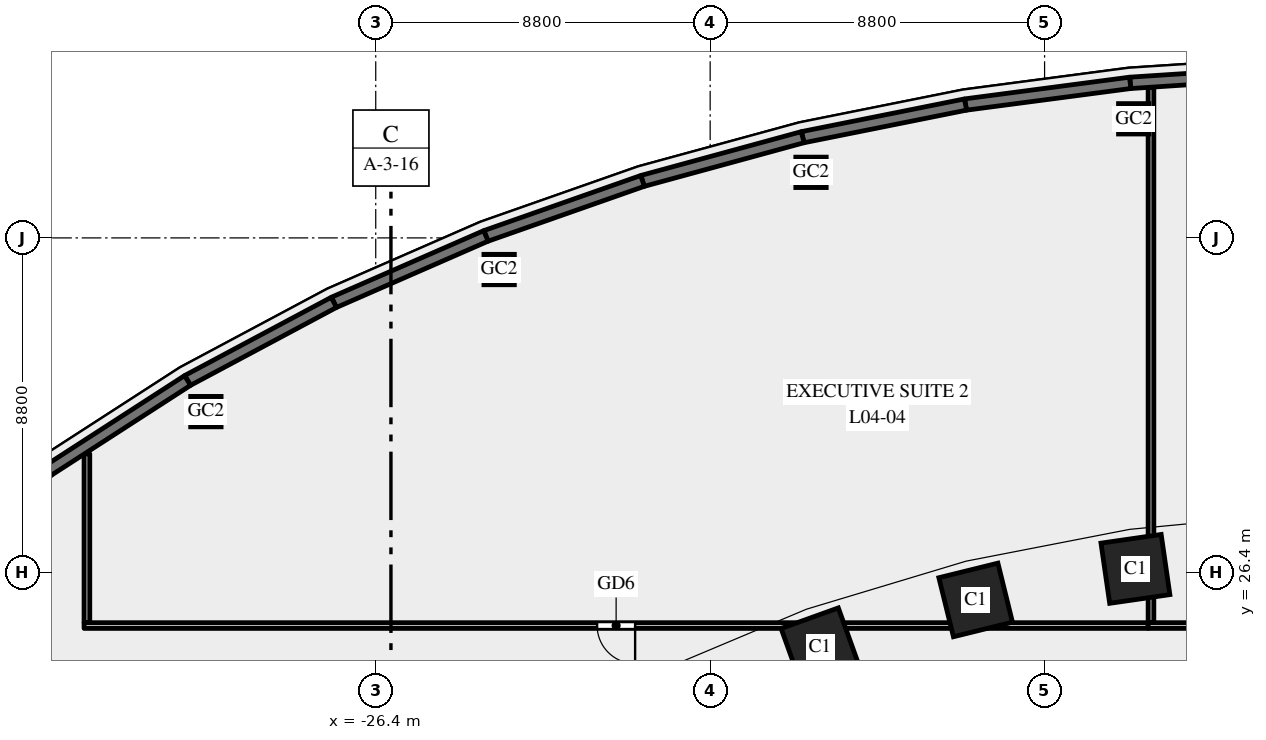
"""IFC4 building model, lengths in metres.
Left out: names, types, materials, properties, quantities, classifications, styles, units other than length and angle.
Written with IfcOpenShell. Run it as: python <this file> out.ifc"""

import sys

from ifc_helpers import new_model, si_unit, direction, frame, frame_2d, origin, origin_2d, place, context, subcontext, project, spatial, rectangle, hollow_rectangle, extrude, element, fill, save


model = new_model("IFC4")
c1 = context("Model", 3, precision=1e-05, world=origin(), true_north=direction((0.0, 1.0)))
c2 = subcontext(c1, "Body", "Model", "MODEL_VIEW")
j1 = project(units=[si_unit("LENGTHUNIT", "METRE"), si_unit("PLANEANGLEUNIT", "RADIAN")], contexts=[c1])
p1 = place(None, origin())
s1 = spatial("IfcSite", under=j1, at=p1, CompositionType="ELEMENT")
p2 = place(p1, origin())
s2 = spatial("IfcBuilding", under=s1, at=p2, CompositionType="ELEMENT")
p3 = place(p2, frame((0.0, 0.0, 25.0)))
s3 = spatial("IfcBuildingStorey", under=s2, at=p3, CompositionType="ELEMENT", Elevation=25.0)
for number, where, z_axis, x_axis in (
    (1, (-6.409, 26.491, 0.0), (0.0, 0.0, 1.0), (-0.99, -0.143, 0.0)),
    (2, (-10.613, 25.674, 0.0), (0.0, 0.0, 1.0), (-0.971, -0.24, 0.0)),
    (3, (-14.709, 24.441, 0.0), (0.0, 0.0, 1.0), (-0.941, -0.338, 0.0)),
):
    element("IfcColumn", number, at=place(p3, frame(where, z_axis=z_axis, x_axis=x_axis)), inside=s3, PredefinedType="COLUMN", context=c2, shape_type="SweptSolid", body=[
        extrude(rectangle(XDim=1.6, YDim=1.6, at=origin_2d()), origin(), (0.0, 0.0, 1.0), 5.5),
    ])
for number, where, z_axis, x_axis in (
    (4, (-6.454, 38.333, 0.0), (0.0, 0.0, 1.0), (1.0, 0.0, 0.0)),
    (5, (-14.946, 36.925, 0.0), (0.0, 0.0, 1.0), (1.0, 0.0, 0.0)),
    (6, (-23.153, 34.368, 0.0), (0.0, 0.0, 1.0), (1.0, 0.0, 0.0)),
    (7, (-30.869, 30.629, 0.0), (0.0, 0.0, 1.0), (1.0, 0.0, 0.0)),
):
    element("IfcColumn", number, at=place(p3, frame(where, z_axis=z_axis, x_axis=x_axis)), inside=s3, PredefinedType="COLUMN", context=c2, shape_type="SweptSolid", body=[
        extrude(hollow_rectangle(XDim=0.8, YDim=0.8, WallThickness=0.04, at=origin_2d()), origin(), (0.0, 0.0, 1.0), 5.488),
    ])
p4 = place(p3, frame((-6.0, 39.165, 0.0), z_axis=(0.0, 0.0, 1.0), x_axis=(0.0, -1.0, 0.0)))
e8 = element("IfcWall", 8, at=p4, inside=s3, PredefinedType="PARTITIONING", context=c2, shape_type="SweptSolid", body=[
    extrude(rectangle(XDim=14.09, YDim=0.15, at=frame_2d((7.045, 0.0))), origin(), (0.0, 0.0, 1.0), 4.2),
])
p5 = place(p3, frame((-34.0, 25.075, 0.0), z_axis=(0.0, 0.0, 1.0), x_axis=(0.0, 1.0, 0.0)))
e9 = element("IfcWall", 9, at=p5, inside=s3, PredefinedType="PARTITIONING", context=c2, shape_type="SweptSolid", body=[
    extrude(rectangle(XDim=4.445, YDim=0.15, at=frame_2d((2.222, 0.0))), origin(), (0.0, 0.0, 1.0), 4.6),
])
p6 = place(p3, frame((-6.074, 25.0, 0.0), z_axis=(0.0, 0.0, 1.0), x_axis=(-1.0, 0.0, 0.0)))
e10 = element("IfcWall", 10, at=p6, inside=s3, PredefinedType="PARTITIONING", context=c2, shape_type="SweptSolid", body=[
    extrude(rectangle(XDim=28.001, YDim=0.15, at=frame_2d((14.0, 0.0))), origin(), (0.0, 0.0, 1.0), 4.2),
])
p7 = place(p6, frame((13.501, 0.0, 0.0)))
e11 = element("IfcOpeningElement", 11, at=p7, cuts=e10, PredefinedType="OPENING", context=c2, shape_type="SweptSolid", body=[
    extrude(rectangle(XDim=1.0, YDim=2.1, at=frame_2d((0.5, 1.05))), frame((0.0, 0.085, 0.0), z_axis=(0.0, -1.0, 0.0), x_axis=(1.0, 0.0, 0.0)), (0.0, 0.0, 1.0), 0.17),
])
p8 = place(p3, frame((34.1, 25.0, 0.0), z_axis=(0.0, 0.0, 1.0), x_axis=(-1.0, 0.0, 0.0)))
e12 = element("IfcWall", 12, at=p8, inside=s3, PredefinedType="PARTITIONING", context=c2, shape_type="SweptSolid", body=[
    extrude(rectangle(XDim=40.175, YDim=0.15, at=frame_2d((20.087, 0.0))), origin(), (0.0, 0.0, 1.0), 4.2),
])
p9 = place(p8, frame((20.887, 0.0, 0.0)))
e13 = element("IfcOpeningElement", 13, at=p9, cuts=e12, PredefinedType="OPENING", context=c2, shape_type="SweptSolid", body=[
    extrude(rectangle(XDim=1.4, YDim=2.1, at=frame_2d((0.7, 1.05))), frame((0.0, 0.085, 0.0), z_axis=(0.0, -1.0, 0.0), x_axis=(1.0, 0.0, 0.0)), (0.0, 0.0, 1.0), 0.17),
])
p10 = place(p3, frame((-2.186, 39.564, 0.0), z_axis=(0.0, 0.0, 1.0), x_axis=(-0.997876871627, -0.065128711577, 0.0)))
e14 = element("IfcWall", 14, at=p10, inside=s3, PredefinedType="SOLIDWALL", context=c2, shape_type="SweptSolid", body=[
    extrude(rectangle(XDim=4.371, YDim=0.3, at=frame_2d((2.186, 0.0))), origin(), (0.0, 0.0, 1.0), 5.2),
])
p11 = place(p10, frame((0.985, 0.0, 1.0)))
e15 = element("IfcOpeningElement", 15, at=p11, cuts=e14, PredefinedType="OPENING", context=c2, shape_type="SweptSolid", body=[
    extrude(rectangle(XDim=2.4, YDim=3.0, at=frame_2d((1.2, 1.5))), frame((0.0, 0.16, 0.0), z_axis=(0.0, -1.0, 0.0), x_axis=(1.0, 0.0, 0.0)), (0.0, 0.0, 1.0), 0.32),
])
p12 = place(p3, frame((-6.547, 39.28, 0.0), z_axis=(0.0, 0.0, 1.0), x_axis=(-0.991441741932, -0.130549884544, 0.0)))
e16 = element("IfcWall", 16, at=p12, inside=s3, PredefinedType="SOLIDWALL", context=c2, shape_type="SweptSolid", body=[
    extrude(rectangle(XDim=4.37, YDim=0.3, at=frame_2d((2.185, 0.0))), origin(), (0.0, 0.0, 1.0), 5.2),
])
p13 = place(p12, frame((0.985, 0.0, 1.0)))
e17 = element("IfcOpeningElement", 17, at=p13, cuts=e16, PredefinedType="OPENING", context=c2, shape_type="SweptSolid", body=[
    extrude(rectangle(XDim=2.4, YDim=3.0, at=frame_2d((1.2, 1.5))), frame((0.0, 0.16, 0.0), z_axis=(0.0, -1.0, 0.0), x_axis=(1.0, 0.0, 0.0)), (0.0, 0.0, 1.0), 0.32),
])
p14 = place(p3, frame((-10.88, 38.709, 0.0), z_axis=(0.0, 0.0, 1.0), x_axis=(-0.980494629762, -0.196545875071, 0.0)))
e18 = element("IfcWall", 18, at=p14, inside=s3, PredefinedType="SOLIDWALL", context=c2, shape_type="SweptSolid", body=[
    extrude(rectangle(XDim=4.37, YDim=0.3, at=frame_2d((2.185, 0.0))), origin(), (0.0, 0.0, 1.0), 5.2),
])
p15 = place(p14, frame((0.985, 0.0, 1.0)))
e19 = element("IfcOpeningElement", 19, at=p15, cuts=e18, PredefinedType="OPENING", context=c2, shape_type="SweptSolid", body=[
    extrude(rectangle(XDim=2.4, YDim=3.0, at=frame_2d((1.2, 1.5))), frame((0.0, 0.16, 0.0), z_axis=(0.0, -1.0, 0.0), x_axis=(1.0, 0.0, 0.0)), (0.0, 0.0, 1.0), 0.32),
])
p16 = place(p3, frame((-15.165, 37.85, 0.0), z_axis=(0.0, 0.0, 1.0), x_axis=(-0.964679950239, -0.263424739931, 0.0)))
e20 = element("IfcWall", 20, at=p16, inside=s3, PredefinedType="SOLIDWALL", context=c2, shape_type="SweptSolid", body=[
    extrude(rectangle(XDim=4.369, YDim=0.3, at=frame_2d((2.185, 0.0))), origin(), (0.0, 0.0, 1.0), 5.2),
])
p17 = place(p16, frame((0.985, 0.0, 1.0)))
e21 = element("IfcOpeningElement", 21, at=p17, cuts=e20, PredefinedType="OPENING", context=c2, shape_type="SweptSolid", body=[
    extrude(rectangle(XDim=2.4, YDim=3.0, at=frame_2d((1.2, 1.5))), frame((0.0, 0.16, 0.0), z_axis=(0.0, -1.0, 0.0), x_axis=(1.0, 0.0, 0.0)), (0.0, 0.0, 1.0), 0.32),
])
p18 = place(p3, frame((-19.379, 36.699, 0.0), z_axis=(0.0, 0.0, 1.0), x_axis=(-0.943526738033, -0.331296384853, 0.0)))
e22 = element("IfcWall", 22, at=p18, inside=s3, PredefinedType="SOLIDWALL", context=c2, shape_type="SweptSolid", body=[
    extrude(rectangle(XDim=4.368, YDim=0.3, at=frame_2d((2.184, 0.0))), origin(), (0.0, 0.0, 1.0), 5.2),
])
p19 = place(p18, frame((0.984, 0.0, 1.0)))
e23 = element("IfcOpeningElement", 23, at=p19, cuts=e22, PredefinedType="OPENING", context=c2, shape_type="SweptSolid", body=[
    extrude(rectangle(XDim=2.4, YDim=3.0, at=frame_2d((1.2, 1.5))), frame((0.0, 0.16, 0.0), z_axis=(0.0, -1.0, 0.0), x_axis=(1.0, 0.0, 0.0)), (0.0, 0.0, 1.0), 0.32),
])
p20 = place(p3, frame((-23.5, 35.252, 0.0), z_axis=(0.0, 0.0, 1.0), x_axis=(-0.916336904548, -0.400408138483, 0.0)))
e24 = element("IfcWall", 24, at=p20, inside=s3, PredefinedType="SOLIDWALL", context=c2, shape_type="SweptSolid", body=[
    extrude(rectangle(XDim=4.366, YDim=0.3, at=frame_2d((2.183, 0.0))), origin(), (0.0, 0.0, 1.0), 5.2),
])
p21 = place(p20, frame((0.983, 0.0, 1.0)))
e25 = element("IfcOpeningElement", 25, at=p21, cuts=e24, PredefinedType="OPENING", context=c2, shape_type="SweptSolid", body=[
    extrude(rectangle(XDim=2.4, YDim=3.0, at=frame_2d((1.2, 1.5))), frame((0.0, 0.16, 0.0), z_axis=(0.0, -1.0, 0.0), x_axis=(1.0, 0.0, 0.0)), (0.0, 0.0, 1.0), 0.32),
])
p22 = place(p3, frame((-27.501, 33.504, 0.0), z_axis=(0.0, 0.0, 1.0), x_axis=(-0.882159305704, -0.47095112205, 0.0)))
e26 = element("IfcWall", 26, at=p22, inside=s3, PredefinedType="SOLIDWALL", context=c2, shape_type="SweptSolid", body=[
    extrude(rectangle(XDim=4.365, YDim=0.3, at=frame_2d((2.182, 0.0))), origin(), (0.0, 0.0, 1.0), 5.2),
])
p23 = place(p22, frame((0.982, 0.0, 1.0)))
e27 = element("IfcOpeningElement", 27, at=p23, cuts=e26, PredefinedType="OPENING", context=c2, shape_type="SweptSolid", body=[
    extrude(rectangle(XDim=2.4, YDim=3.0, at=frame_2d((1.2, 1.5))), frame((0.0, 0.16, 0.0), z_axis=(0.0, -1.0, 0.0), x_axis=(1.0, 0.0, 0.0)), (0.0, 0.0, 1.0), 0.32),
])
p24 = place(p3, frame((-31.352, 31.448, 0.0), z_axis=(0.0, 0.0, 1.0), x_axis=(-0.840047348843, -0.542513088969, 0.0)))
e28 = element("IfcWall", 28, at=p24, inside=s3, PredefinedType="SOLIDWALL", context=c2, shape_type="SweptSolid", body=[
    extrude(rectangle(XDim=4.362, YDim=0.3, at=frame_2d((2.181, 0.0))), origin(), (0.0, 0.0, 1.0), 5.2),
])
p25 = place(p24, frame((0.691, 0.0, 1.0)))
e29 = element("IfcOpeningElement", 29, at=p25, cuts=e28, PredefinedType="OPENING", context=c2, shape_type="SweptSolid", body=[
    extrude(rectangle(XDim=2.4, YDim=3.0, at=frame_2d((1.2, 1.5))), frame((0.0, 0.16, 0.0), z_axis=(0.0, -1.0, 0.0), x_axis=(1.0, 0.0, 0.0)), (0.0, 0.0, 1.0), 0.32),
])
p26 = place(p3, frame((-35.016, 29.082, 0.0), z_axis=(0.0, 0.0, 1.0), x_axis=(-0.788491985196, -0.615045030288, 0.0)))
e30 = element("IfcWall", 30, at=p26, inside=s3, PredefinedType="SOLIDWALL", context=c2, shape_type="SweptSolid", body=[
    extrude(rectangle(XDim=4.359, YDim=0.3, at=frame_2d((2.18, 0.0))), origin(), (0.0, 0.0, 1.0), 5.2),
])
p27 = place(p26, frame((0.98, 0.0, 1.0)))
e31 = element("IfcOpeningElement", 31, at=p27, cuts=e30, PredefinedType="OPENING", context=c2, shape_type="SweptSolid", body=[
    extrude(rectangle(XDim=2.4, YDim=3.0, at=frame_2d((1.2, 1.5))), frame((0.0, 0.16, 0.0), z_axis=(0.0, -1.0, 0.0), x_axis=(1.0, 0.0, 0.0)), (0.0, 0.0, 1.0), 0.32),
])
p28 = place(p7, origin())
e32 = element("IfcDoor", 32, at=p28, inside=s3, OperationType="SINGLE_SWING_LEFT", PredefinedType="DOOR", context=c2, shape_type="SweptSolid", body=[
    extrude(rectangle(XDim=1.0, YDim=2.1, at=frame_2d((0.5, 1.05))), frame((0.0, 0.025, 0.0), z_axis=(0.0, -1.0, 0.0), x_axis=(1.0, 0.0, 0.0)), (0.0, 0.0, 1.0), 0.05),
])
fill(e11, e32)
p29 = place(p11, origin())
e33 = element("IfcWindow", 33, at=p29, inside=s3, PartitioningType="SINGLE_PANEL", PredefinedType="WINDOW", context=c2, shape_type="SweptSolid", body=[
    extrude(rectangle(XDim=2.4, YDim=3.0, at=frame_2d((1.2, 1.5))), frame((0.0, 0.03, 0.0), z_axis=(0.0, -1.0, 0.0), x_axis=(1.0, 0.0, 0.0)), (0.0, 0.0, 1.0), 0.06),
])
fill(e15, e33)
p30 = place(p13, origin())
e34 = element("IfcWindow", 34, at=p30, inside=s3, PartitioningType="SINGLE_PANEL", PredefinedType="WINDOW", context=c2, shape_type="SweptSolid", body=[
    extrude(rectangle(XDim=2.4, YDim=3.0, at=frame_2d((1.2, 1.5))), frame((0.0, 0.03, 0.0), z_axis=(0.0, -1.0, 0.0), x_axis=(1.0, 0.0, 0.0)), (0.0, 0.0, 1.0), 0.06),
])
fill(e17, e34)
p31 = place(p15, origin())
e35 = element("IfcWindow", 35, at=p31, inside=s3, PartitioningType="SINGLE_PANEL", PredefinedType="WINDOW", context=c2, shape_type="SweptSolid", body=[
    extrude(rectangle(XDim=2.4, YDim=3.0, at=frame_2d((1.2, 1.5))), frame((0.0, 0.03, 0.0), z_axis=(0.0, -1.0, 0.0), x_axis=(1.0, 0.0, 0.0)), (0.0, 0.0, 1.0), 0.06),
])
fill(e19, e35)
p32 = place(p17, origin())
e36 = element("IfcWindow", 36, at=p32, inside=s3, PartitioningType="SINGLE_PANEL", PredefinedType="WINDOW", context=c2, shape_type="SweptSolid", body=[
    extrude(rectangle(XDim=2.4, YDim=3.0, at=frame_2d((1.2, 1.5))), frame((0.0, 0.03, 0.0), z_axis=(0.0, -1.0, 0.0), x_axis=(1.0, 0.0, 0.0)), (0.0, 0.0, 1.0), 0.06),
])
fill(e21, e36)
p33 = place(p19, origin())
e37 = element("IfcWindow", 37, at=p33, inside=s3, PartitioningType="SINGLE_PANEL", PredefinedType="WINDOW", context=c2, shape_type="SweptSolid", body=[
    extrude(rectangle(XDim=2.4, YDim=3.0, at=frame_2d((1.2, 1.5))), frame((0.0, 0.03, 0.0), z_axis=(0.0, -1.0, 0.0), x_axis=(1.0, 0.0, 0.0)), (0.0, 0.0, 1.0), 0.06),
])
fill(e23, e37)
p34 = place(p21, origin())
e38 = element("IfcWindow", 38, at=p34, inside=s3, PartitioningType="SINGLE_PANEL", PredefinedType="WINDOW", context=c2, shape_type="SweptSolid", body=[
    extrude(rectangle(XDim=2.4, YDim=3.0, at=frame_2d((1.2, 1.5))), frame((0.0, 0.03, 0.0), z_axis=(0.0, -1.0, 0.0), x_axis=(1.0, 0.0, 0.0)), (0.0, 0.0, 1.0), 0.06),
])
fill(e25, e38)
p35 = place(p23, origin())
e39 = element("IfcWindow", 39, at=p35, inside=s3, PartitioningType="SINGLE_PANEL", PredefinedType="WINDOW", context=c2, shape_type="SweptSolid", body=[
    extrude(rectangle(XDim=2.4, YDim=3.0, at=frame_2d((1.2, 1.5))), frame((0.0, 0.03, 0.0), z_axis=(0.0, -1.0, 0.0), x_axis=(1.0, 0.0, 0.0)), (0.0, 0.0, 1.0), 0.06),
])
fill(e27, e39)
p36 = place(p25, origin())
e40 = element("IfcWindow", 40, at=p36, inside=s3, PartitioningType="SINGLE_PANEL", PredefinedType="WINDOW", context=c2, shape_type="SweptSolid", body=[
    extrude(rectangle(XDim=2.4, YDim=3.0, at=frame_2d((1.2, 1.5))), frame((0.0, 0.03, 0.0), z_axis=(0.0, -1.0, 0.0), x_axis=(1.0, 0.0, 0.0)), (0.0, 0.0, 1.0), 0.06),
])
fill(e29, e40)
save(model, sys.argv[1])
